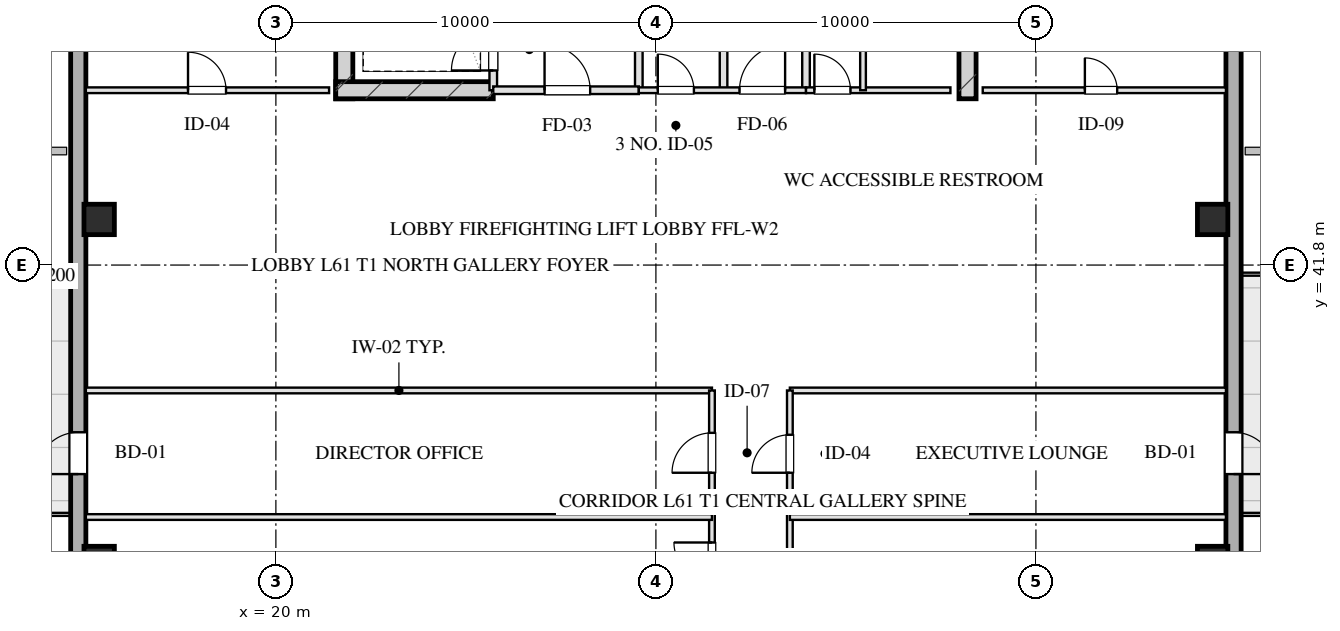
"""IFC4 building model, lengths in metres.
Left out: names, types, materials, properties, quantities, classifications, styles, units other than length and angle.
Written with IfcOpenShell. Run it as: python <this file> out.ifc"""

import sys

from ifc_helpers import new_model, si_unit, direction, frame, frame_2d, origin, origin_2d, place, context, subcontext, project, spatial, rectangle, hollow_rectangle, extrude, element, fill, save


model = new_model("IFC4")
c1 = context("Model", 3, precision=1e-05, world=origin(), true_north=direction((0.0, 1.0)))
c2 = subcontext(c1, "Body", "Model", "MODEL_VIEW")
j1 = project(units=[si_unit("LENGTHUNIT", "METRE"), si_unit("PLANEANGLEUNIT", "RADIAN")], contexts=[c1])
p1 = place(None, origin())
s1 = spatial("IfcSite", under=j1, at=p1, CompositionType="ELEMENT")
p2 = place(p1, origin())
s2 = spatial("IfcBuilding", under=s1, at=p2, CompositionType="ELEMENT")
p3 = place(p2, frame((0.0, 0.0, 226.55)))
s3 = spatial("IfcBuildingStorey", under=s2, at=p3, CompositionType="ELEMENT", Elevation=226.55)
for number, where, z_axis, x_axis in (
    (1, (21.8, 46.175, 0.0), (0.0, 0.0, 1.0), (0.0, 1.0, 0.0)),
    (2, (38.2, 46.175, 0.0), (0.0, 0.0, 1.0), (0.0, 1.0, 0.0)),
):
    element("IfcWall", number, at=place(p3, frame(where, z_axis=z_axis, x_axis=x_axis)), inside=s3, PredefinedType="SHEAR", context=c2, shape_type="SweptSolid", body=[
        extrude(rectangle(XDim=9.33, YDim=0.45, at=frame_2d((4.665, 0.0))), origin(), (0.0, 0.0, 1.0), 3.45),
    ])
p4 = place(p3, frame((21.575, 46.4, 0.0), z_axis=(0.0, 0.0, 1.0), x_axis=(1.0, 0.0, 0.0)))
e3 = element("IfcWall", 3, at=p4, inside=s3, PredefinedType="SHEAR", context=c2, shape_type="SweptSolid", body=[
    extrude(rectangle(XDim=4.145, YDim=0.45, at=frame_2d((2.073, 0.0))), origin(), (0.0, 0.0, 1.0), 3.45),
])
for number, where, z_axis, x_axis in (
    (4, (15.35, 34.0, 0.0), (0.0, 0.0, 1.0), (1.0, 0.0, 0.0)),
    (5, (15.35, 43.0, 0.0), (0.0, 0.0, 1.0), (1.0, 0.0, 0.0)),
    (6, (44.65, 34.0, 0.0), (0.0, 0.0, 1.0), (1.0, 0.0, 0.0)),
    (7, (44.65, 43.0, 0.0), (0.0, 0.0, 1.0), (1.0, 0.0, 0.0)),
):
    element("IfcColumn", number, at=place(p3, frame(where, z_axis=z_axis, x_axis=x_axis)), inside=s3, PredefinedType="COLUMN", context=c2, shape_type="SweptSolid", body=[
        extrude(hollow_rectangle(XDim=0.8, YDim=0.8, WallThickness=0.028, at=origin_2d()), origin(), (0.0, 0.0, 1.0), 3.451),
    ])
p5 = place(p3, frame((14.8, 13.1, 0.0), z_axis=(0.0, 0.0, 1.0), x_axis=(0.0, 1.0, 0.0)))
e8 = element("IfcWall", 8, at=p5, inside=s3, PredefinedType="SOLIDWALL", context=c2, shape_type="SweptSolid", body=[
    extrude(rectangle(XDim=41.8, YDim=0.4, at=frame_2d((20.9, 0.0))), origin(), (0.0, 0.0, 1.0), 2.55),
])
p6 = place(p5, frame((13.525, 0.0, 0.75)))
e9 = element("IfcOpeningElement", 9, at=p6, cuts=e8, PredefinedType="OPENING", context=c2, shape_type="SweptSolid", body=[
    extrude(rectangle(XDim=1.95, YDim=1.4, at=frame_2d((0.975, 0.7))), frame((0.0, 0.21, 0.0), z_axis=(0.0, -1.0, 0.0), x_axis=(1.0, 0.0, 0.0)), (0.0, 0.0, 1.0), 0.42),
])
p7 = place(p5, frame((17.325, 0.0, 0.75)))
e10 = element("IfcOpeningElement", 10, at=p7, cuts=e8, PredefinedType="OPENING", context=c2, shape_type="SweptSolid", body=[
    extrude(rectangle(XDim=1.95, YDim=1.4, at=frame_2d((0.975, 0.7))), frame((0.0, 0.21, 0.0), z_axis=(0.0, -1.0, 0.0), x_axis=(1.0, 0.0, 0.0)), (0.0, 0.0, 1.0), 0.42),
])
p8 = place(p5, frame((23.2, 0.0, 0.0)))
e11 = element("IfcOpeningElement", 11, at=p8, cuts=e8, PredefinedType="OPENING", context=c2, shape_type="SweptSolid", body=[
    extrude(rectangle(XDim=1.1, YDim=2.15, at=frame_2d((0.55, 1.075))), frame((0.0, 0.21, 0.0), z_axis=(0.0, -1.0, 0.0), x_axis=(1.0, 0.0, 0.0)), (0.0, 0.0, 1.0), 0.42),
])
p9 = place(p3, frame((45.2, 54.9, 0.0), z_axis=(0.0, 0.0, 1.0), x_axis=(0.0, -1.0, 0.0)))
e12 = element("IfcWall", 12, at=p9, inside=s3, PredefinedType="SOLIDWALL", context=c2, shape_type="SweptSolid", body=[
    extrude(rectangle(XDim=41.8, YDim=0.4, at=frame_2d((20.9, 0.0))), origin(), (0.0, 0.0, 1.0), 2.55),
])
p10 = place(p9, frame((26.325, 0.0, 0.75)))
e13 = element("IfcOpeningElement", 13, at=p10, cuts=e12, PredefinedType="OPENING", context=c2, shape_type="SweptSolid", body=[
    extrude(rectangle(XDim=1.95, YDim=1.4, at=frame_2d((0.975, 0.7))), frame((0.0, 0.21, 0.0), z_axis=(0.0, -1.0, 0.0), x_axis=(1.0, 0.0, 0.0)), (0.0, 0.0, 1.0), 0.42),
])
p11 = place(p9, frame((22.525, 0.0, 0.75)))
e14 = element("IfcOpeningElement", 14, at=p11, cuts=e12, PredefinedType="OPENING", context=c2, shape_type="SweptSolid", body=[
    extrude(rectangle(XDim=1.95, YDim=1.4, at=frame_2d((0.975, 0.7))), frame((0.0, 0.21, 0.0), z_axis=(0.0, -1.0, 0.0), x_axis=(1.0, 0.0, 0.0)), (0.0, 0.0, 1.0), 0.42),
])
p12 = place(p9, frame((17.5, 0.0, 0.0)))
e15 = element("IfcOpeningElement", 15, at=p12, cuts=e12, PredefinedType="OPENING", context=c2, shape_type="SweptSolid", body=[
    extrude(rectangle(XDim=1.1, YDim=2.15, at=frame_2d((0.55, 1.075))), frame((0.0, 0.21, 0.0), z_axis=(0.0, -1.0, 0.0), x_axis=(1.0, 0.0, 0.0)), (0.0, 0.0, 1.0), 0.42),
])
p13 = place(p3, frame((25.72, 46.4, 0.0), z_axis=(0.0, 0.0, 1.0), x_axis=(0.0, 1.0, 0.0)))
e16 = element("IfcWall", 16, at=p13, inside=s3, PredefinedType="PARTITIONING", context=c2, shape_type="SweptSolid", body=[
    extrude(rectangle(XDim=1.9, YDim=0.2, at=frame_2d((0.95, 0.0))), origin(), (0.0, 0.0, 1.0), 3.155),
])
p14 = place(p13, frame((0.52, 0.0, 0.0)))
e17 = element("IfcOpeningElement", 17, at=p14, cuts=e16, PredefinedType="OPENING", context=c2, shape_type="SweptSolid", body=[
    extrude(rectangle(XDim=1.1, YDim=2.05, at=frame_2d((0.55, 1.025))), frame((0.0, 0.11, 0.0), z_axis=(0.0, -1.0, 0.0), x_axis=(1.0, 0.0, 0.0)), (0.0, 0.0, 1.0), 0.22),
])
p15 = place(p3, frame((29.55, 46.4, 0.0), z_axis=(0.0, 0.0, 1.0), x_axis=(0.0, 1.0, 0.0)))
e18 = element("IfcWall", 18, at=p15, inside=s3, PredefinedType="PARTITIONING", context=c2, shape_type="SweptSolid", body=[
    extrude(rectangle(XDim=8.43, YDim=0.2, at=frame_2d((4.215, 0.0))), origin(), (0.0, 0.0, 1.0), 3.155),
])
p16 = place(p3, frame((25.72, 46.4, 0.0), z_axis=(0.0, 0.0, 1.0), x_axis=(1.0, 0.0, 0.0)))
e19 = element("IfcWall", 19, at=p16, inside=s3, PredefinedType="PARTITIONING", context=c2, shape_type="SweptSolid", body=[
    extrude(rectangle(XDim=3.83, YDim=0.2, at=frame_2d((1.915, 0.0))), origin(), (0.0, 0.0, 1.0), 3.155),
])
p17 = place(p16, frame((1.35, 0.0, 0.0)))
e20 = element("IfcOpeningElement", 20, at=p17, cuts=e19, PredefinedType="OPENING", context=c2, shape_type="SweptSolid", body=[
    extrude(rectangle(XDim=1.2, YDim=2.05, at=frame_2d((0.6, 1.025))), frame((0.0, 0.11, 0.0), z_axis=(0.0, -1.0, 0.0), x_axis=(1.0, 0.0, 0.0)), (0.0, 0.0, 1.0), 0.22),
])
for number, where, z_axis, x_axis in (
    (21, (33.95, 46.4, 0.0), (0.0, 0.0, 1.0), (0.0, 1.0, 0.0)),
    (22, (31.78, 46.4, 0.0), (0.0, 0.0, 1.0), (0.0, 1.0, 0.0)),
):
    element("IfcWall", number, at=place(p3, frame(where, z_axis=z_axis, x_axis=x_axis)), inside=s3, PredefinedType="PARTITIONING", context=c2, shape_type="SweptSolid", body=[
        extrude(rectangle(XDim=8.43, YDim=0.2, at=frame_2d((4.215, 0.0))), origin(), (0.0, 0.0, 1.0), 3.155),
    ])
p18 = place(p3, frame((29.55, 46.4, 0.0), z_axis=(0.0, 0.0, 1.0), x_axis=(1.0, 0.0, 0.0)))
e23 = element("IfcWall", 23, at=p18, inside=s3, PredefinedType="PARTITIONING", context=c2, shape_type="SweptSolid", body=[
    extrude(rectangle(XDim=4.4, YDim=0.15, at=frame_2d((2.2, 0.0))), origin(), (0.0, 0.0, 1.0), 3.155),
])
p19 = place(p18, frame((0.5, 0.0, 0.0)))
e24 = element("IfcOpeningElement", 24, at=p19, cuts=e23, PredefinedType="OPENING", context=c2, shape_type="SweptSolid", body=[
    extrude(rectangle(XDim=0.95, YDim=2.05, at=frame_2d((0.475, 1.025))), frame((0.0, 0.085, 0.0), z_axis=(0.0, -1.0, 0.0), x_axis=(1.0, 0.0, 0.0)), (0.0, 0.0, 1.0), 0.17),
])
p20 = place(p18, frame((2.65, 0.0, 0.0)))
e25 = element("IfcOpeningElement", 25, at=p20, cuts=e23, PredefinedType="OPENING", context=c2, shape_type="SweptSolid", body=[
    extrude(rectangle(XDim=1.2, YDim=2.05, at=frame_2d((0.6, 1.025))), frame((0.0, 0.085, 0.0), z_axis=(0.0, -1.0, 0.0), x_axis=(1.0, 0.0, 0.0)), (0.0, 0.0, 1.0), 0.17),
])
p21 = place(p3, frame((33.95, 46.4, 0.0), z_axis=(0.0, 0.0, 1.0), x_axis=(1.0, 0.0, 0.0)))
e26 = element("IfcWall", 26, at=p21, inside=s3, PredefinedType="PARTITIONING", context=c2, shape_type="SweptSolid", body=[
    extrude(rectangle(XDim=3.8, YDim=0.15, at=frame_2d((1.9, 0.0))), origin(), (0.0, 0.0, 1.0), 3.155),
])
p22 = place(p21, frame((0.22, 0.0, 0.0)))
e27 = element("IfcOpeningElement", 27, at=p22, cuts=e26, PredefinedType="OPENING", context=c2, shape_type="SweptSolid", body=[
    extrude(rectangle(XDim=0.95, YDim=2.05, at=frame_2d((0.475, 1.025))), frame((0.0, 0.085, 0.0), z_axis=(0.0, -1.0, 0.0), x_axis=(1.0, 0.0, 0.0)), (0.0, 0.0, 1.0), 0.17),
])
p23 = place(p3, frame((35.45, 46.4, 0.0), z_axis=(0.0, 0.0, 1.0), x_axis=(0.0, 1.0, 0.0)))
e28 = element("IfcWall", 28, at=p23, inside=s3, PredefinedType="PARTITIONING", context=c2, shape_type="SweptSolid", body=[
    extrude(rectangle(XDim=8.43, YDim=0.15, at=frame_2d((4.215, 0.0))), origin(), (0.0, 0.0, 1.0), 2.795),
])
p24 = place(p23, frame((2.55, 0.0, 0.0)))
e29 = element("IfcOpeningElement", 29, at=p24, cuts=e28, PredefinedType="OPENING", context=c2, shape_type="SweptSolid", body=[
    extrude(rectangle(XDim=0.95, YDim=2.05, at=frame_2d((0.475, 1.025))), frame((0.0, 0.085, 0.0), z_axis=(0.0, -1.0, 0.0), x_axis=(1.0, 0.0, 0.0)), (0.0, 0.0, 1.0), 0.17),
])
p25 = place(p23, frame((5.8, 0.0, 0.0)))
e30 = element("IfcOpeningElement", 30, at=p25, cuts=e28, PredefinedType="OPENING", context=c2, shape_type="SweptSolid", body=[
    extrude(rectangle(XDim=0.9, YDim=2.05, at=frame_2d((0.45, 1.025))), frame((0.0, 0.085, 0.0), z_axis=(0.0, -1.0, 0.0), x_axis=(1.0, 0.0, 0.0)), (0.0, 0.0, 1.0), 0.17),
])
p26 = place(p3, frame((15.0, 46.4, 0.0), z_axis=(0.0, 0.0, 1.0), x_axis=(1.0, 0.0, 0.0)))
e31 = element("IfcWall", 31, at=p26, inside=s3, PredefinedType="PARTITIONING", context=c2, shape_type="SweptSolid", body=[
    extrude(rectangle(XDim=6.4, YDim=0.15, at=frame_2d((3.2, 0.0))), origin(), (0.0, 0.0, 1.0), 3.155),
])
p27 = place(p26, frame((2.688, 0.0, 0.0)))
e32 = element("IfcOpeningElement", 32, at=p27, cuts=e31, PredefinedType="OPENING", context=c2, shape_type="SweptSolid", body=[
    extrude(rectangle(XDim=1.0, YDim=2.05, at=frame_2d((0.5, 1.025))), frame((0.0, 0.085, 0.0), z_axis=(0.0, -1.0, 0.0), x_axis=(1.0, 0.0, 0.0)), (0.0, 0.0, 1.0), 0.17),
])
p28 = place(p3, frame((38.6, 46.4, 0.0), z_axis=(0.0, 0.0, 1.0), x_axis=(1.0, 0.0, 0.0)))
e33 = element("IfcWall", 33, at=p28, inside=s3, PredefinedType="PARTITIONING", context=c2, shape_type="SweptSolid", body=[
    extrude(rectangle(XDim=6.4, YDim=0.15, at=frame_2d((3.2, 0.0))), origin(), (0.0, 0.0, 1.0), 3.155),
])
p29 = place(p28, frame((2.688, 0.0, 0.0)))
e34 = element("IfcOpeningElement", 34, at=p29, cuts=e33, PredefinedType="OPENING", context=c2, shape_type="SweptSolid", body=[
    extrude(rectangle(XDim=0.85, YDim=2.05, at=frame_2d((0.425, 1.025))), frame((0.0, 0.085, 0.0), z_axis=(0.0, -1.0, 0.0), x_axis=(1.0, 0.0, 0.0)), (0.0, 0.0, 1.0), 0.17),
])
p30 = place(p3, frame((15.0, 38.5, 0.0), z_axis=(0.0, 0.0, 1.0), x_axis=(1.0, 0.0, 0.0)))
e35 = element("IfcWall", 35, at=p30, inside=s3, PredefinedType="PARTITIONING", context=c2, shape_type="SweptSolid", body=[
    extrude(rectangle(XDim=16.475, YDim=0.15, at=frame_2d((8.238, 0.0))), origin(), (0.0, 0.0, 1.0), 3.155),
])
p31 = place(p3, frame((33.525, 38.5, 0.0), z_axis=(0.0, 0.0, 1.0), x_axis=(1.0, 0.0, 0.0)))
e36 = element("IfcWall", 36, at=p31, inside=s3, PredefinedType="PARTITIONING", context=c2, shape_type="SweptSolid", body=[
    extrude(rectangle(XDim=11.475, YDim=0.15, at=frame_2d((5.738, 0.0))), origin(), (0.0, 0.0, 1.0), 3.155),
])
p32 = place(p3, frame((31.475, 29.5, 0.0), z_axis=(0.0, 0.0, 1.0), x_axis=(0.0, 1.0, 0.0)))
e37 = element("IfcWall", 37, at=p32, inside=s3, PredefinedType="PARTITIONING", context=c2, shape_type="SweptSolid", body=[
    extrude(rectangle(XDim=9.0, YDim=0.15, at=frame_2d((4.5, 0.0))), origin(), (0.0, 0.0, 1.0), 3.155),
])
p33 = place(p32, frame((1.165, 0.0, 0.0)))
e38 = element("IfcOpeningElement", 38, at=p33, cuts=e37, PredefinedType="OPENING", context=c2, shape_type="SweptSolid", body=[
    extrude(rectangle(XDim=1.0, YDim=2.05, at=frame_2d((0.5, 1.025))), frame((0.0, 0.085, 0.0), z_axis=(0.0, -1.0, 0.0), x_axis=(1.0, 0.0, 0.0)), (0.0, 0.0, 1.0), 0.17),
])
p34 = place(p32, frame((4.0, 0.0, 0.0)))
e39 = element("IfcOpeningElement", 39, at=p34, cuts=e37, PredefinedType="OPENING", context=c2, shape_type="SweptSolid", body=[
    extrude(rectangle(XDim=1.0, YDim=2.05, at=frame_2d((0.5, 1.025))), frame((0.0, 0.085, 0.0), z_axis=(0.0, -1.0, 0.0), x_axis=(1.0, 0.0, 0.0)), (0.0, 0.0, 1.0), 0.17),
])
p35 = place(p32, frame((6.835, 0.0, 0.0)))
e40 = element("IfcOpeningElement", 40, at=p35, cuts=e37, PredefinedType="OPENING", context=c2, shape_type="SweptSolid", body=[
    extrude(rectangle(XDim=1.05, YDim=2.05, at=frame_2d((0.525, 1.025))), frame((0.0, 0.085, 0.0), z_axis=(0.0, -1.0, 0.0), x_axis=(1.0, 0.0, 0.0)), (0.0, 0.0, 1.0), 0.17),
])
p36 = place(p3, frame((33.525, 29.5, 0.0), z_axis=(0.0, 0.0, 1.0), x_axis=(0.0, 1.0, 0.0)))
e41 = element("IfcWall", 41, at=p36, inside=s3, PredefinedType="PARTITIONING", context=c2, shape_type="SweptSolid", body=[
    extrude(rectangle(XDim=9.0, YDim=0.15, at=frame_2d((4.5, 0.0))), origin(), (0.0, 0.0, 1.0), 3.155),
])
p37 = place(p36, frame((2.335, 0.0, 0.0)))
e42 = element("IfcOpeningElement", 42, at=p37, cuts=e41, PredefinedType="OPENING", context=c2, shape_type="SweptSolid", body=[
    extrude(rectangle(XDim=1.0, YDim=2.05, at=frame_2d((0.5, 1.025))), frame((0.0, 0.085, 0.0), z_axis=(0.0, -1.0, 0.0), x_axis=(1.0, 0.0, 0.0)), (0.0, 0.0, 1.0), 0.17),
])
p38 = place(p36, frame((6.835, 0.0, 0.0)))
e43 = element("IfcOpeningElement", 43, at=p38, cuts=e41, PredefinedType="OPENING", context=c2, shape_type="SweptSolid", body=[
    extrude(rectangle(XDim=1.0, YDim=2.05, at=frame_2d((0.5, 1.025))), frame((0.0, 0.085, 0.0), z_axis=(0.0, -1.0, 0.0), x_axis=(1.0, 0.0, 0.0)), (0.0, 0.0, 1.0), 0.17),
])
p39 = place(p3, frame((15.0, 35.17, 0.0), z_axis=(0.0, 0.0, 1.0), x_axis=(1.0, 0.0, 0.0)))
e44 = element("IfcWall", 44, at=p39, inside=s3, PredefinedType="PARTITIONING", context=c2, shape_type="SweptSolid", body=[
    extrude(rectangle(XDim=16.475, YDim=0.15, at=frame_2d((8.238, 0.0))), origin(), (0.0, 0.0, 1.0), 3.155),
])
p40 = place(p3, frame((33.525, 35.17, 0.0), z_axis=(0.0, 0.0, 1.0), x_axis=(1.0, 0.0, 0.0)))
e45 = element("IfcWall", 45, at=p40, inside=s3, PredefinedType="PARTITIONING", context=c2, shape_type="SweptSolid", body=[
    extrude(rectangle(XDim=11.475, YDim=0.15, at=frame_2d((5.738, 0.0))), origin(), (0.0, 0.0, 1.0), 3.155),
])
p41 = place(p8, origin())
e46 = element("IfcDoor", 46, at=p41, inside=s3, OperationType="SINGLE_SWING_LEFT", PredefinedType="DOOR", context=c2, shape_type="SweptSolid", body=[
    extrude(rectangle(XDim=1.1, YDim=2.15, at=frame_2d((0.55, 1.075))), frame((0.0, 0.025, 0.0), z_axis=(0.0, -1.0, 0.0), x_axis=(1.0, 0.0, 0.0)), (0.0, 0.0, 1.0), 0.05),
])
fill(e11, e46)
p42 = place(p12, origin())
e47 = element("IfcDoor", 47, at=p42, inside=s3, OperationType="SINGLE_SWING_RIGHT", PredefinedType="DOOR", context=c2, shape_type="SweptSolid", body=[
    extrude(rectangle(XDim=1.1, YDim=2.15, at=frame_2d((0.55, 1.075))), frame((0.0, 0.025, 0.0), z_axis=(0.0, -1.0, 0.0), x_axis=(1.0, 0.0, 0.0)), (0.0, 0.0, 1.0), 0.05),
])
fill(e15, e47)
p43 = place(p14, origin())
e48 = element("IfcDoor", 48, at=p43, inside=s3, OperationType="SINGLE_SWING_LEFT", PredefinedType="DOOR", context=c2, shape_type="SweptSolid", body=[
    extrude(rectangle(XDim=1.1, YDim=2.05, at=frame_2d((0.55, 1.025))), frame((0.0, 0.025, 0.0), z_axis=(0.0, -1.0, 0.0), x_axis=(1.0, 0.0, 0.0)), (0.0, 0.0, 1.0), 0.05),
])
fill(e17, e48)
p44 = place(p17, origin())
e49 = element("IfcDoor", 49, at=p44, inside=s3, OperationType="SINGLE_SWING_LEFT", PredefinedType="DOOR", context=c2, shape_type="SweptSolid", body=[
    extrude(rectangle(XDim=1.2, YDim=2.05, at=frame_2d((0.6, 1.025))), frame((0.0, 0.025, 0.0), z_axis=(0.0, -1.0, 0.0), x_axis=(1.0, 0.0, 0.0)), (0.0, 0.0, 1.0), 0.05),
])
fill(e20, e49)
p45 = place(p19, origin())
e50 = element("IfcDoor", 50, at=p45, inside=s3, OperationType="SINGLE_SWING_LEFT", PredefinedType="DOOR", context=c2, shape_type="SweptSolid", body=[
    extrude(rectangle(XDim=0.95, YDim=2.05, at=frame_2d((0.475, 1.025))), frame((0.0, 0.025, 0.0), z_axis=(0.0, -1.0, 0.0), x_axis=(1.0, 0.0, 0.0)), (0.0, 0.0, 1.0), 0.05),
])
fill(e24, e50)
p46 = place(p20, origin())
e51 = element("IfcDoor", 51, at=p46, inside=s3, OperationType="SINGLE_SWING_RIGHT", PredefinedType="DOOR", context=c2, shape_type="SweptSolid", body=[
    extrude(rectangle(XDim=1.2, YDim=2.05, at=frame_2d((0.6, 1.025))), frame((0.0, 0.025, 0.0), z_axis=(0.0, -1.0, 0.0), x_axis=(1.0, 0.0, 0.0)), (0.0, 0.0, 1.0), 0.05),
])
fill(e25, e51)
p47 = place(p22, origin())
e52 = element("IfcDoor", 52, at=p47, inside=s3, OperationType="SINGLE_SWING_LEFT", PredefinedType="DOOR", context=c2, shape_type="SweptSolid", body=[
    extrude(rectangle(XDim=0.95, YDim=2.05, at=frame_2d((0.475, 1.025))), frame((0.0, 0.025, 0.0), z_axis=(0.0, -1.0, 0.0), x_axis=(1.0, 0.0, 0.0)), (0.0, 0.0, 1.0), 0.05),
])
fill(e27, e52)
p48 = place(p27, origin())
e53 = element("IfcDoor", 53, at=p48, inside=s3, OperationType="SINGLE_SWING_LEFT", PredefinedType="DOOR", context=c2, shape_type="SweptSolid", body=[
    extrude(rectangle(XDim=1.0, YDim=2.05, at=frame_2d((0.5, 1.025))), frame((0.0, 0.025, 0.0), z_axis=(0.0, -1.0, 0.0), x_axis=(1.0, 0.0, 0.0)), (0.0, 0.0, 1.0), 0.05),
])
fill(e32, e53)
p49 = place(p29, origin())
e54 = element("IfcDoor", 54, at=p49, inside=s3, OperationType="SINGLE_SWING_LEFT", PredefinedType="DOOR", context=c2, shape_type="SweptSolid", body=[
    extrude(rectangle(XDim=0.85, YDim=2.05, at=frame_2d((0.425, 1.025))), frame((0.0, 0.025, 0.0), z_axis=(0.0, -1.0, 0.0), x_axis=(1.0, 0.0, 0.0)), (0.0, 0.0, 1.0), 0.05),
])
fill(e34, e54)
p50 = place(p34, origin())
e55 = element("IfcDoor", 55, at=p50, inside=s3, OperationType="SINGLE_SWING_RIGHT", PredefinedType="DOOR", context=c2, shape_type="SweptSolid", body=[
    extrude(rectangle(XDim=1.0, YDim=2.05, at=frame_2d((0.5, 1.025))), frame((0.0, 0.025, 0.0), z_axis=(0.0, -1.0, 0.0), x_axis=(1.0, 0.0, 0.0)), (0.0, 0.0, 1.0), 0.05),
])
fill(e39, e55)
p51 = place(p35, origin())
e56 = element("IfcDoor", 56, at=p51, inside=s3, OperationType="SINGLE_SWING_LEFT", PredefinedType="DOOR", context=c2, shape_type="SweptSolid", body=[
    extrude(rectangle(XDim=1.05, YDim=2.05, at=frame_2d((0.525, 1.025))), frame((0.0, 0.025, 0.0), z_axis=(0.0, -1.0, 0.0), x_axis=(1.0, 0.0, 0.0)), (0.0, 0.0, 1.0), 0.05),
])
fill(e40, e56)
p52 = place(p38, origin())
e57 = element("IfcDoor", 57, at=p52, inside=s3, OperationType="SINGLE_SWING_LEFT", PredefinedType="DOOR", context=c2, shape_type="SweptSolid", body=[
    extrude(rectangle(XDim=1.0, YDim=2.05, at=frame_2d((0.5, 1.025))), frame((0.0, 0.025, 0.0), z_axis=(0.0, -1.0, 0.0), x_axis=(1.0, 0.0, 0.0)), (0.0, 0.0, 1.0), 0.05),
])
fill(e43, e57)
save(model, sys.argv[1])
